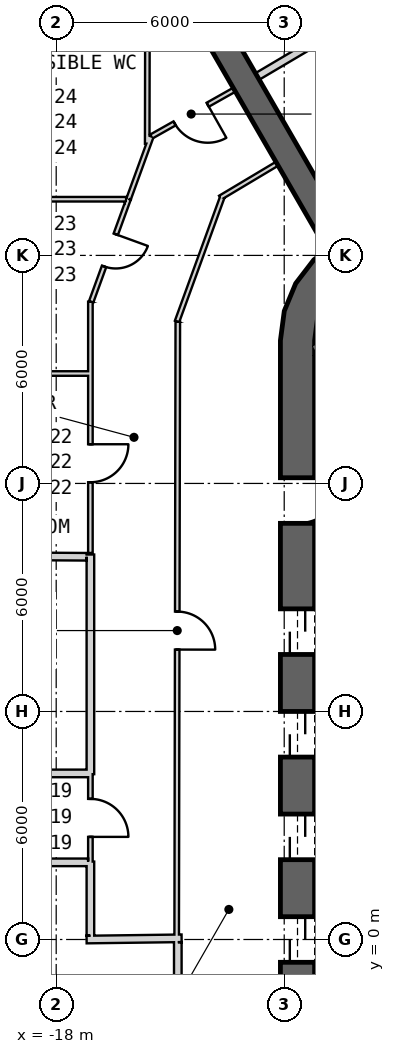
"""IFC4 building model, lengths in metres.
Left out: names, types, materials, properties, quantities, classifications, styles, units other than length and angle.
Written with IfcOpenShell. Run it as: python <this file> out.ifc"""

import sys

from ifc_helpers import new_model, si_unit, direction, frame, frame_2d, origin, place, context, subcontext, project, spatial, polyline, rectangle, outline, extrude, element, fill, save


model = new_model("IFC4")
c1 = context("Model", 3, precision=1e-05, world=origin(), true_north=direction((0.0, 1.0)))
c2 = subcontext(c1, "Body", "Model", "MODEL_VIEW")
j1 = project(units=[si_unit("LENGTHUNIT", "METRE"), si_unit("PLANEANGLEUNIT", "RADIAN")], contexts=[c1])
p1 = place(None, origin())
s1 = spatial("IfcSite", under=j1, at=p1, CompositionType="ELEMENT")
p2 = place(p1, origin())
s2 = spatial("IfcBuilding", under=s1, at=p2, CompositionType="ELEMENT")
p3 = place(p2, frame((0.0, 0.0, 217.2)))
s3 = spatial("IfcBuildingStorey", under=s2, at=p3, CompositionType="ELEMENT", Elevation=217.2)
p4 = place(p3, frame((-11.65, 15.762, 0.0), z_axis=(0.0, 0.0, 1.0), x_axis=(0.0, -1.0, 0.0)))
e1 = element("IfcWall", 1, at=p4, inside=s3, PredefinedType="SHEAR", context=c2, shape_type="SweptSolid", body=[
    extrude(rectangle(XDim=31.523, YDim=0.9, at=frame_2d((15.762, 0.0))), origin(), (0.0, 0.0, 1.0), 4.0),
])
p5 = place(p4, frame((7.062, 0.0, 0.0)))
e2 = element("IfcOpeningElement", 2, at=p5, cuts=e1, PredefinedType="OPENING", context=c2, shape_type="SweptSolid", body=[
    extrude(rectangle(XDim=1.2, YDim=2.4, at=frame_2d((0.6, 1.2))), frame((0.0, 0.46, 0.0), z_axis=(0.0, -1.0, 0.0), x_axis=(1.0, 0.0, 0.0)), (0.0, 0.0, 1.0), 0.92),
])
p6 = place(p4, frame((9.762, 0.0, 0.0)))
e3 = element("IfcOpeningElement", 3, at=p6, cuts=e1, PredefinedType="OPENING", context=c2, shape_type="SweptSolid", body=[
    extrude(rectangle(XDim=1.2, YDim=2.4, at=frame_2d((0.6, 1.2))), frame((0.0, 0.46, 0.0), z_axis=(0.0, -1.0, 0.0), x_axis=(1.0, 0.0, 0.0)), (0.0, 0.0, 1.0), 0.92),
])
p7 = place(p4, frame((12.462, 0.0, 0.0)))
e4 = element("IfcOpeningElement", 4, at=p7, cuts=e1, PredefinedType="OPENING", context=c2, shape_type="SweptSolid", body=[
    extrude(rectangle(XDim=1.2, YDim=2.4, at=frame_2d((0.6, 1.2))), frame((0.0, 0.46, 0.0), z_axis=(0.0, -1.0, 0.0), x_axis=(1.0, 0.0, 0.0)), (0.0, 0.0, 1.0), 0.92),
])
p8 = place(p4, frame((15.162, 0.0, 0.0)))
e5 = element("IfcOpeningElement", 5, at=p8, cuts=e1, PredefinedType="OPENING", context=c2, shape_type="SweptSolid", body=[
    extrude(rectangle(XDim=1.2, YDim=2.4, at=frame_2d((0.6, 1.2))), frame((0.0, 0.46, 0.0), z_axis=(0.0, -1.0, 0.0), x_axis=(1.0, 0.0, 0.0)), (0.0, 0.0, 1.0), 0.92),
])
p9 = place(p4, frame((17.862, 0.0, 0.0)))
e6 = element("IfcOpeningElement", 6, at=p9, cuts=e1, PredefinedType="OPENING", context=c2, shape_type="SweptSolid", body=[
    extrude(rectangle(XDim=1.2, YDim=2.4, at=frame_2d((0.6, 1.2))), frame((0.0, 0.46, 0.0), z_axis=(0.0, -1.0, 0.0), x_axis=(1.0, 0.0, 0.0)), (0.0, 0.0, 1.0), 0.92),
])
p10 = place(p4, frame((20.562, 0.0, 0.0)))
e7 = element("IfcOpeningElement", 7, at=p10, cuts=e1, PredefinedType="OPENING", context=c2, shape_type="SweptSolid", body=[
    extrude(rectangle(XDim=1.2, YDim=2.4, at=frame_2d((0.6, 1.2))), frame((0.0, 0.46, 0.0), z_axis=(0.0, -1.0, 0.0), x_axis=(1.0, 0.0, 0.0)), (0.0, 0.0, 1.0), 0.92),
])
p11 = place(p4, frame((23.262, 0.0, 0.0)))
e8 = element("IfcOpeningElement", 8, at=p11, cuts=e1, PredefinedType="OPENING", context=c2, shape_type="SweptSolid", body=[
    extrude(rectangle(XDim=1.2, YDim=2.4, at=frame_2d((0.6, 1.2))), frame((0.0, 0.46, 0.0), z_axis=(0.0, -1.0, 0.0), x_axis=(1.0, 0.0, 0.0)), (0.0, 0.0, 1.0), 0.92),
])
p12 = place(p4, frame((3.612, 0.0, 0.0)))
e9 = element("IfcOpeningElement", 9, at=p12, cuts=e1, PredefinedType="OPENING", context=c2, shape_type="SweptSolid", body=[
    extrude(rectangle(XDim=1.2, YDim=2.4, at=frame_2d((0.6, 1.2))), frame((0.0, 0.46, 0.0), z_axis=(0.0, -1.0, 0.0), x_axis=(1.0, 0.0, 0.0)), (0.0, 0.0, 1.0), 0.92),
])
p13 = place(p4, frame((26.712, 0.0, 0.0)))
e10 = element("IfcOpeningElement", 10, at=p13, cuts=e1, PredefinedType="OPENING", context=c2, shape_type="SweptSolid", body=[
    extrude(rectangle(XDim=1.2, YDim=2.4, at=frame_2d((0.6, 1.2))), frame((0.0, 0.46, 0.0), z_axis=(0.0, -1.0, 0.0), x_axis=(1.0, 0.0, 0.0)), (0.0, 0.0, 1.0), 0.92),
])
p14 = place(p3, origin())
e11 = element("IfcWall", 11, at=p14, inside=s3, PredefinedType="SHEAR", context=c2, shape_type="SweptSolid", body=[
    extrude(outline(polyline([(-7.6, 18.36), (-8.323, 18.659), (-9.1, 18.762), (-9.876, 18.659), (-10.6, 18.36), (-11.221, 17.883), (-11.698, 17.262), (-11.998, 16.538), (-12.1, 15.762), (-11.2, 15.762), (-11.128, 16.305), (-10.919, 16.812), (-10.585, 17.247), (-10.15, 17.58), (-9.644, 17.79), (-9.1, 17.862), (-8.556, 17.79), (-8.05, 17.58), (-7.6, 18.36)])), origin(), (0.0, 0.0, 1.0), 4.0),
])
p15 = place(p3, frame((-10.575, 18.316, 0.0), z_axis=(0.0, 0.0, 1.0), x_axis=(-0.499998001389, 0.86602655768, 0.0)))
e12 = element("IfcWall", 12, at=p15, inside=s3, PredefinedType="SHEAR", context=c2, shape_type="SweptSolid", body=[
    extrude(rectangle(XDim=11.581, YDim=0.7, at=frame_2d((5.791, 0.0))), origin(), (0.0, 0.0, 1.0), 4.0),
])
p16 = place(p3, frame((-11.2, 9.42, 0.0), z_axis=(0.0, 0.0, 1.0), x_axis=(0.999957167047, 0.009255488683, 0.0)))
e13 = element("IfcWall", 13, at=p16, inside=s3, PredefinedType="PLUMBINGWALL", context=c2, shape_type="SweptSolid", body=[
    extrude(rectangle(XDim=3.35, YDim=0.2, at=frame_2d((1.675, 0.0))), origin(), (0.0, 0.0, 1.0), 3.7),
])
p17 = place(p3, frame((-11.245, 15.678, -0.3), z_axis=(0.0, 0.0, 1.0), x_axis=(0.499977274689, -0.866038523851, 0.0)))
e14 = element("IfcWall", 14, at=p17, inside=s3, PredefinedType="SHEAR", context=c2, shape_type="SweptSolid", body=[
    extrude(rectangle(XDim=8.1, YDim=0.2, at=frame_2d((4.05, 0.0))), origin(), (0.0, 0.0, 1.0), 4.0),
])
p18 = place(p3, frame((-12.189, 20.411, 0.0), z_axis=(0.0, 0.0, 1.0), x_axis=(-0.858492721014, -0.51282574815, 0.0)))
e15 = element("IfcWall", 15, at=p18, inside=s3, PredefinedType="PARTITIONING", context=c2, shape_type="SweptSolid", body=[
    extrude(rectangle(XDim=1.742, YDim=0.12, at=frame_2d((0.871, 0.0))), origin(), (0.0, 0.0, 1.0), 3.7),
])
p19 = place(p3, frame((-13.631, 19.53, 0.0), z_axis=(0.0, 0.0, 1.0), x_axis=(-0.342069878069, -0.939674517329, 0.0)))
e16 = element("IfcWall", 16, at=p19, inside=s3, PredefinedType="PARTITIONING", context=c2, shape_type="SweptSolid", body=[
    extrude(rectangle(XDim=3.479, YDim=0.12, at=frame_2d((1.739, 0.0))), origin(), (0.0, 0.0, 1.0), 2.78),
])
p20 = place(p3, frame((-14.8, 16.257, 0.0), z_axis=(0.0, 0.0, 1.0), x_axis=(-0.001847148781, -0.999998294019, 0.0)))
e17 = element("IfcWall", 17, at=p20, inside=s3, PredefinedType="PARTITIONING", context=c2, shape_type="SweptSolid", body=[
    extrude(rectangle(XDim=16.257, YDim=0.12, at=frame_2d((8.128, 0.0))), origin(), (0.0, 0.0, 1.0), 2.88),
])
p21 = place(p20, frame((7.629, 0.0, 0.0)))
e18 = element("IfcOpeningElement", 18, at=p21, cuts=e17, PredefinedType="OPENING", context=c2, shape_type="SweptSolid", body=[
    extrude(rectangle(XDim=1.0, YDim=2.1, at=frame_2d((0.5, 1.05))), frame((0.0, 0.07, 0.0), z_axis=(0.0, -1.0, 0.0), x_axis=(1.0, 0.0, 0.0)), (0.0, 0.0, 1.0), 0.14),
])
p22 = place(p3, frame((-17.1, 16.783, 0.0), z_axis=(0.0, 0.0, 1.0), x_axis=(0.0, -1.0, 0.0)))
e19 = element("IfcWall", 19, at=p22, inside=s3, PredefinedType="PARTITIONING", context=c2, shape_type="SweptSolid", body=[
    extrude(rectangle(XDim=6.613, YDim=0.12, at=frame_2d((3.306, 0.0))), origin(), (0.0, 0.0, 1.0), 2.88),
])
p23 = place(p22, frame((3.751, 0.0, 0.0)))
e20 = element("IfcOpeningElement", 20, at=p23, cuts=e19, PredefinedType="OPENING", context=c2, shape_type="SweptSolid", body=[
    extrude(rectangle(XDim=1.0, YDim=2.1, at=frame_2d((0.5, 1.05))), frame((0.0, 0.07, 0.0), z_axis=(0.0, -1.0, 0.0), x_axis=(1.0, 0.0, 0.0)), (0.0, 0.0, 1.0), 0.14),
])
p24 = place(p3, frame((-17.1, 4.35, 0.0), z_axis=(0.0, 0.0, 1.0), x_axis=(0.0, -1.0, 0.0)))
e21 = element("IfcWall", 21, at=p24, inside=s3, PredefinedType="PARTITIONING", context=c2, shape_type="SweptSolid", body=[
    extrude(rectangle(XDim=2.3, YDim=0.12, at=frame_2d((1.15, 0.0))), origin(), (0.0, 0.0, 1.0), 3.7),
])
p25 = place(p24, frame((0.65, 0.0, 0.0)))
e22 = element("IfcOpeningElement", 22, at=p25, cuts=e21, PredefinedType="OPENING", context=c2, shape_type="SweptSolid", body=[
    extrude(rectangle(XDim=1.0, YDim=2.1, at=frame_2d((0.5, 1.05))), frame((0.0, 0.07, 0.0), z_axis=(0.0, -1.0, 0.0), x_axis=(1.0, 0.0, 0.0)), (0.0, 0.0, 1.0), 0.14),
])
p26 = place(p3, frame((-17.2, -0.001, 0.0), z_axis=(0.0, 0.0, 1.0), x_axis=(0.999915662945, 0.012987185857, 0.0)))
e23 = element("IfcWall", 23, at=p26, inside=s3, PredefinedType="PARTITIONING", context=c2, shape_type="SweptSolid", body=[
    extrude(rectangle(XDim=2.5, YDim=0.2, at=frame_2d((1.25, 0.0))), origin(), (0.0, 0.0, 1.0), 3.07),
])
p27 = place(p3, frame((-17.1, 10.13, 0.0), z_axis=(0.0, 0.0, 1.0), x_axis=(0.0, -1.0, 0.0)))
e24 = element("IfcWall", 24, at=p27, inside=s3, PredefinedType="PARTITIONING", context=c2, shape_type="SweptSolid", body=[
    extrude(rectangle(XDim=5.78, YDim=0.2, at=frame_2d((2.89, 0.0))), origin(), (0.0, 0.0, 1.0), 3.07),
])
p28 = place(p3, frame((-17.1, 2.05, 0.0), z_axis=(0.0, 0.0, 1.0), x_axis=(0.0, -1.0, 0.0)))
e25 = element("IfcWall", 25, at=p28, inside=s3, PredefinedType="PARTITIONING", context=c2, shape_type="SweptSolid", body=[
    extrude(rectangle(XDim=1.95, YDim=0.2, at=frame_2d((0.975, 0.0))), origin(), (0.0, 0.0, 1.0), 3.07),
])
p29 = place(p3, frame((-15.496, 21.129, 0.0), z_axis=(0.0, 0.0, 1.0), x_axis=(-0.342023613346, -0.939691357795, 0.0)))
e26 = element("IfcWall", 26, at=p29, inside=s3, PredefinedType="PARTITIONING", context=c2, shape_type="SweptSolid", body=[
    extrude(rectangle(XDim=1.747, YDim=0.12, at=frame_2d((0.873, 0.0))), origin(), (0.0, 0.0, 1.0), 2.78),
])
p30 = place(p3, frame((-16.094, 19.488, 0.0), z_axis=(0.0, 0.0, 1.0), x_axis=(-0.342028686382, -0.939689511324, 0.0)))
e27 = element("IfcWall", 27, at=p30, inside=s3, PredefinedType="PARTITIONING", context=c2, shape_type="SweptSolid", body=[
    extrude(rectangle(XDim=2.882, YDim=0.12, at=frame_2d((1.441, 0.0))), origin(), (0.0, 0.0, 1.0), 2.78),
])
p31 = place(p30, frame((0.991, 0.0, 0.0)))
e28 = element("IfcOpeningElement", 28, at=p31, cuts=e27, PredefinedType="OPENING", context=c2, shape_type="SweptSolid", body=[
    extrude(rectangle(XDim=0.9, YDim=2.1, at=frame_2d((0.45, 1.05))), frame((0.0, 0.07, 0.0), z_axis=(0.0, -1.0, 0.0), x_axis=(1.0, 0.0, 0.0)), (0.0, 0.0, 1.0), 0.14),
])
p32 = place(p3, frame((-13.313, 22.359, 0.0), z_axis=(0.0, 0.0, 1.0), x_axis=(-0.87126053708, -0.490820819167, 0.0)))
e29 = element("IfcWall", 29, at=p32, inside=s3, PredefinedType="PARTITIONING", context=c2, shape_type="SweptSolid", body=[
    extrude(rectangle(XDim=2.506, YDim=0.12, at=frame_2d((1.253, 0.0))), origin(), (0.0, 0.0, 1.0), 3.7),
])
p33 = place(p32, frame((0.803, 0.0, 0.0)))
e30 = element("IfcOpeningElement", 30, at=p33, cuts=e29, PredefinedType="OPENING", context=c2, shape_type="SweptSolid", body=[
    extrude(rectangle(XDim=1.0, YDim=2.1, at=frame_2d((0.5, 1.05))), frame((0.0, 0.07, 0.0), z_axis=(0.0, -1.0, 0.0), x_axis=(1.0, 0.0, 0.0)), (0.0, 0.0, 1.0), 0.14),
])
p34 = place(p3, frame((-14.8, -0.07, 0.0), z_axis=(0.0, 0.0, 1.0), x_axis=(0.0, -1.0, 0.0)))
e31 = element("IfcWall", 31, at=p34, inside=s3, PredefinedType="PARTITIONING", context=c2, shape_type="SweptSolid", body=[
    extrude(rectangle(XDim=16.147, YDim=0.2, at=frame_2d((8.073, 0.0))), origin(), (0.0, 0.0, 1.0), 2.88),
])
p35 = place(p34, frame((12.765, 0.0, 0.0)))
e32 = element("IfcOpeningElement", 32, at=p35, cuts=e31, PredefinedType="OPENING", context=c2, shape_type="SweptSolid", body=[
    extrude(rectangle(XDim=1.0, YDim=2.1, at=frame_2d((0.5, 1.05))), frame((0.0, 0.11, 0.0), z_axis=(0.0, -1.0, 0.0), x_axis=(1.0, 0.0, 0.0)), (0.0, 0.0, 1.0), 0.22),
])
p36 = place(p3, frame((-10.449, 24.044, 0.0), z_axis=(0.0, 0.0, 1.0), x_axis=(-0.860744847861, -0.509036645912, 0.0)))
e33 = element("IfcWall", 33, at=p36, inside=s3, PredefinedType="PARTITIONING", context=c2, shape_type="SweptSolid", body=[
    extrude(rectangle(XDim=2.623, YDim=0.2, at=frame_2d((1.311, 0.0))), origin(), (0.0, 0.0, 1.0), 3.7),
])
p37 = place(p3, frame((-29.421, 2.03, 0.0), z_axis=(0.0, 0.0, 1.0), x_axis=(1.0, 0.0, 0.0)))
e34 = element("IfcWall", 34, at=p37, inside=s3, PredefinedType="PARTITIONING", context=c2, shape_type="SweptSolid", body=[
    extrude(rectangle(XDim=12.261, YDim=0.2, at=frame_2d((6.13, 0.0))), origin(), (0.0, 0.0, 1.0), 3.7),
])
p38 = place(p37, frame((0.2, 0.0, 0.0)))
e35 = element("IfcOpeningElement", 35, at=p38, cuts=e34, PredefinedType="OPENING", context=c2, shape_type="SweptSolid", body=[
    extrude(rectangle(XDim=1.0, YDim=2.1, at=frame_2d((0.5, 1.05))), frame((0.0, 0.11, 0.0), z_axis=(0.0, -1.0, 0.0), x_axis=(1.0, 0.0, 0.0)), (0.0, 0.0, 1.0), 0.22),
])
p39 = place(p3, frame((-17.16, 4.37, 0.0), z_axis=(0.0, 0.0, 1.0), x_axis=(-1.0, 0.0, 0.0)))
e36 = element("IfcWall", 36, at=p39, inside=s3, PredefinedType="PARTITIONING", context=c2, shape_type="SweptSolid", body=[
    extrude(rectangle(XDim=12.322, YDim=0.2, at=frame_2d((6.161, 0.0))), origin(), (0.0, 0.0, 1.0), 3.7),
])
p40 = place(p39, frame((5.661, 0.0, 0.0)))
e37 = element("IfcOpeningElement", 37, at=p40, cuts=e36, PredefinedType="OPENING", context=c2, shape_type="SweptSolid", body=[
    extrude(rectangle(XDim=1.0, YDim=2.1, at=frame_2d((0.5, 1.05))), frame((0.0, 0.11, 0.0), z_axis=(0.0, -1.0, 0.0), x_axis=(1.0, 0.0, 0.0)), (0.0, 0.0, 1.0), 0.22),
])
p41 = place(p3, frame((-21.79, 10.099, 0.0), z_axis=(0.0, 0.0, 1.0), x_axis=(0.99998030485, -0.006276138289, 0.0)))
e38 = element("IfcWall", 38, at=p41, inside=s3, PredefinedType="PARTITIONING", context=c2, shape_type="SweptSolid", body=[
    extrude(rectangle(XDim=4.59, YDim=0.2, at=frame_2d((2.295, 0.0))), origin(), (0.0, 0.0, 1.0), 3.7),
])
p42 = place(p3, frame((-21.79, 14.892, 0.0), z_axis=(0.0, 0.0, 1.0), x_axis=(1.0, 0.0, 0.0)))
e39 = element("IfcWall", 39, at=p42, inside=s3, PredefinedType="PARTITIONING", context=c2, shape_type="SweptSolid", body=[
    extrude(rectangle(XDim=4.63, YDim=0.12, at=frame_2d((2.315, 0.0))), origin(), (0.0, 0.0, 1.0), 3.7),
])
p43 = place(p3, frame((-21.79, 19.478, 0.0), z_axis=(0.0, 0.0, 1.0), x_axis=(1.0, 0.0, 0.0)))
e40 = element("IfcWall", 40, at=p43, inside=s3, PredefinedType="PARTITIONING", context=c2, shape_type="SweptSolid", body=[
    extrude(rectangle(XDim=5.629, YDim=0.12, at=frame_2d((2.814, 0.0))), origin(), (0.0, 0.0, 1.0), 2.88),
])
p44 = place(p43, frame((2.365, 0.0, 0.0)))
e41 = element("IfcOpeningElement", 41, at=p44, cuts=e40, PredefinedType="OPENING", context=c2, shape_type="SweptSolid", body=[
    extrude(rectangle(XDim=0.9, YDim=2.1, at=frame_2d((0.45, 1.05))), frame((0.0, 0.07, 0.0), z_axis=(0.0, -1.0, 0.0), x_axis=(1.0, 0.0, 0.0)), (0.0, 0.0, 1.0), 0.14),
])
p45 = place(p3, frame((-15.605, 20.939, 0.0), z_axis=(0.0, 0.0, 1.0), x_axis=(0.001847571904, 0.999998293238, 0.0)))
e42 = element("IfcWall", 42, at=p45, inside=s3, PredefinedType="PARTITIONING", context=c2, shape_type="SweptSolid", body=[
    extrude(rectangle(XDim=2.643, YDim=0.12, at=frame_2d((1.321, 0.0))), origin(), (0.0, 0.0, 1.0), 3.7),
])
p46 = place(p21, origin())
e43 = element("IfcDoor", 43, at=p46, inside=s3, OperationType="SINGLE_SWING_RIGHT", PredefinedType="NOTDEFINED", context=c2, shape_type="SweptSolid", body=[
    extrude(rectangle(XDim=1.0, YDim=2.1, at=frame_2d((0.5, 1.05))), frame((0.0, 0.025, 0.0), z_axis=(0.0, -1.0, 0.0), x_axis=(1.0, 0.0, 0.0)), (0.0, 0.0, 1.0), 0.05),
])
fill(e18, e43)
p47 = place(p25, origin())
e44 = element("IfcDoor", 44, at=p47, inside=s3, OperationType="SINGLE_SWING_LEFT", PredefinedType="NOTDEFINED", context=c2, shape_type="SweptSolid", body=[
    extrude(rectangle(XDim=1.0, YDim=2.1, at=frame_2d((0.5, 1.05))), frame((0.0, 0.025, 0.0), z_axis=(0.0, -1.0, 0.0), x_axis=(1.0, 0.0, 0.0)), (0.0, 0.0, 1.0), 0.05),
])
fill(e22, e44)
p48 = place(p23, origin())
e45 = element("IfcDoor", 45, at=p48, inside=s3, OperationType="SINGLE_SWING_RIGHT", PredefinedType="NOTDEFINED", context=c2, shape_type="SweptSolid", body=[
    extrude(rectangle(XDim=1.0, YDim=2.1, at=frame_2d((0.5, 1.05))), frame((0.0, 0.025, 0.0), z_axis=(0.0, -1.0, 0.0), x_axis=(1.0, 0.0, 0.0)), (0.0, 0.0, 1.0), 0.05),
])
fill(e20, e45)
p49 = place(p31, origin())
e46 = element("IfcDoor", 46, at=p49, inside=s3, OperationType="SINGLE_SWING_LEFT", PredefinedType="NOTDEFINED", context=c2, shape_type="SweptSolid", body=[
    extrude(rectangle(XDim=0.9, YDim=2.1, at=frame_2d((0.45, 1.05))), frame((0.0, 0.025, 0.0), z_axis=(0.0, -1.0, 0.0), x_axis=(1.0, 0.0, 0.0)), (0.0, 0.0, 1.0), 0.05),
])
fill(e28, e46)
p50 = place(p33, origin())
e47 = element("IfcDoor", 47, at=p50, inside=s3, OperationType="SINGLE_SWING_LEFT", PredefinedType="NOTDEFINED", context=c2, shape_type="SweptSolid", body=[
    extrude(rectangle(XDim=1.0, YDim=2.1, at=frame_2d((0.5, 1.05))), frame((0.0, 0.025, 0.0), z_axis=(0.0, -1.0, 0.0), x_axis=(1.0, 0.0, 0.0)), (0.0, 0.0, 1.0), 0.05),
])
fill(e30, e47)
p51 = place(p5, origin())
e48 = element("IfcDoor", 48, at=p51, inside=s3, OperationType="SLIDING_TO_LEFT", PredefinedType="USERDEFINED", context=c2, shape_type="SweptSolid", body=[
    extrude(rectangle(XDim=1.2, YDim=2.4, at=frame_2d((0.6, 1.2))), frame((0.0, 0.025, 0.0), z_axis=(0.0, -1.0, 0.0), x_axis=(1.0, 0.0, 0.0)), (0.0, 0.0, 1.0), 0.05),
])
fill(e2, e48)
p52 = place(p6, origin())
e49 = element("IfcDoor", 49, at=p52, inside=s3, OperationType="SLIDING_TO_LEFT", PredefinedType="USERDEFINED", context=c2, shape_type="SweptSolid", body=[
    extrude(rectangle(XDim=1.2, YDim=2.4, at=frame_2d((0.6, 1.2))), frame((0.0, 0.025, 0.0), z_axis=(0.0, -1.0, 0.0), x_axis=(1.0, 0.0, 0.0)), (0.0, 0.0, 1.0), 0.05),
])
fill(e3, e49)
p53 = place(p7, origin())
e50 = element("IfcDoor", 50, at=p53, inside=s3, OperationType="SLIDING_TO_LEFT", PredefinedType="USERDEFINED", context=c2, shape_type="SweptSolid", body=[
    extrude(rectangle(XDim=1.2, YDim=2.4, at=frame_2d((0.6, 1.2))), frame((0.0, 0.025, 0.0), z_axis=(0.0, -1.0, 0.0), x_axis=(1.0, 0.0, 0.0)), (0.0, 0.0, 1.0), 0.05),
])
fill(e4, e50)
p54 = place(p8, origin())
e51 = element("IfcDoor", 51, at=p54, inside=s3, OperationType="SLIDING_TO_LEFT", PredefinedType="USERDEFINED", context=c2, shape_type="SweptSolid", body=[
    extrude(rectangle(XDim=1.2, YDim=2.4, at=frame_2d((0.6, 1.2))), frame((0.0, 0.025, 0.0), z_axis=(0.0, -1.0, 0.0), x_axis=(1.0, 0.0, 0.0)), (0.0, 0.0, 1.0), 0.05),
])
fill(e5, e51)
p55 = place(p12, origin())
e52 = element("IfcDoor", 52, at=p55, inside=s3, OperationType="SINGLE_SWING_LEFT", PredefinedType="USERDEFINED", context=c2, shape_type="SweptSolid", body=[
    extrude(rectangle(XDim=1.2, YDim=2.4, at=frame_2d((0.6, 1.2))), frame((0.0, 0.025, 0.0), z_axis=(0.0, -1.0, 0.0), x_axis=(1.0, 0.0, 0.0)), (0.0, 0.0, 1.0), 0.05),
])
fill(e9, e52)
save(model, sys.argv[1])
